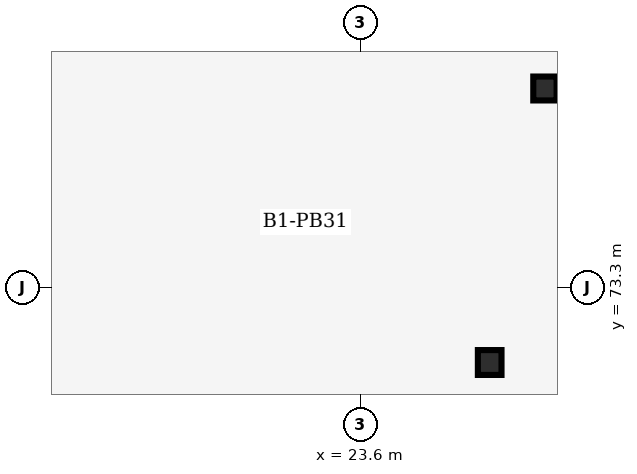
"""IFC4 building model, lengths in metres.
Left out: names, types, materials, properties, quantities, classifications, styles, units other than length and angle.
Written with IfcOpenShell. Run it as: python <this file> out.ifc"""

import sys

from ifc_helpers import new_model, si_unit, direction, frame, origin, origin_2d, place, context, subcontext, project, spatial, i_section, extrude, element, save


model = new_model("IFC4")
c1 = context("Model", 3, precision=1e-05, world=origin(), true_north=direction((0.0, 1.0)))
c2 = subcontext(c1, "Body", "Model", "MODEL_VIEW")
j1 = project(units=[si_unit("LENGTHUNIT", "METRE"), si_unit("PLANEANGLEUNIT", "RADIAN")], contexts=[c1])
p1 = place(None, origin())
s1 = spatial("IfcSite", under=j1, at=p1, CompositionType="ELEMENT")
p2 = place(p1, origin())
s2 = spatial("IfcBuilding", under=s1, at=p2, CompositionType="ELEMENT")
p3 = place(p2, frame((0.0, 0.0, -4.8)))
s3 = spatial("IfcBuildingStorey", under=s2, at=p3, CompositionType="ELEMENT", Elevation=-4.8)
p4 = place(p3, frame((26.029, 75.919, 0.0), z_axis=(0.0, 0.0, 1.0), x_axis=(1.0, 0.0, 0.0)))
e1 = element("IfcColumn", 1, at=p4, inside=s3, PredefinedType="COLUMN", context=c2, shape_type="SweptSolid", body=[
    extrude(i_section(OverallWidth=0.307, OverallDepth=0.315, WebThickness=0.012, FlangeThickness=0.019, at=origin_2d()), origin(), (0.0, 0.0, 1.0), 4.8),
])
p5 = place(p3, frame((25.302, 72.314, 0.0), z_axis=(0.0, 0.0, 1.0), x_axis=(1.0, 0.0, 0.0)))
e2 = element("IfcColumn", 2, at=p5, inside=s3, PredefinedType="COLUMN", context=c2, shape_type="SweptSolid", body=[
    extrude(i_section(OverallWidth=0.311, OverallDepth=0.327, WebThickness=0.016, FlangeThickness=0.025, at=origin_2d()), origin(), (0.0, 0.0, 1.0), 4.8),
])
save(model, sys.argv[1])
